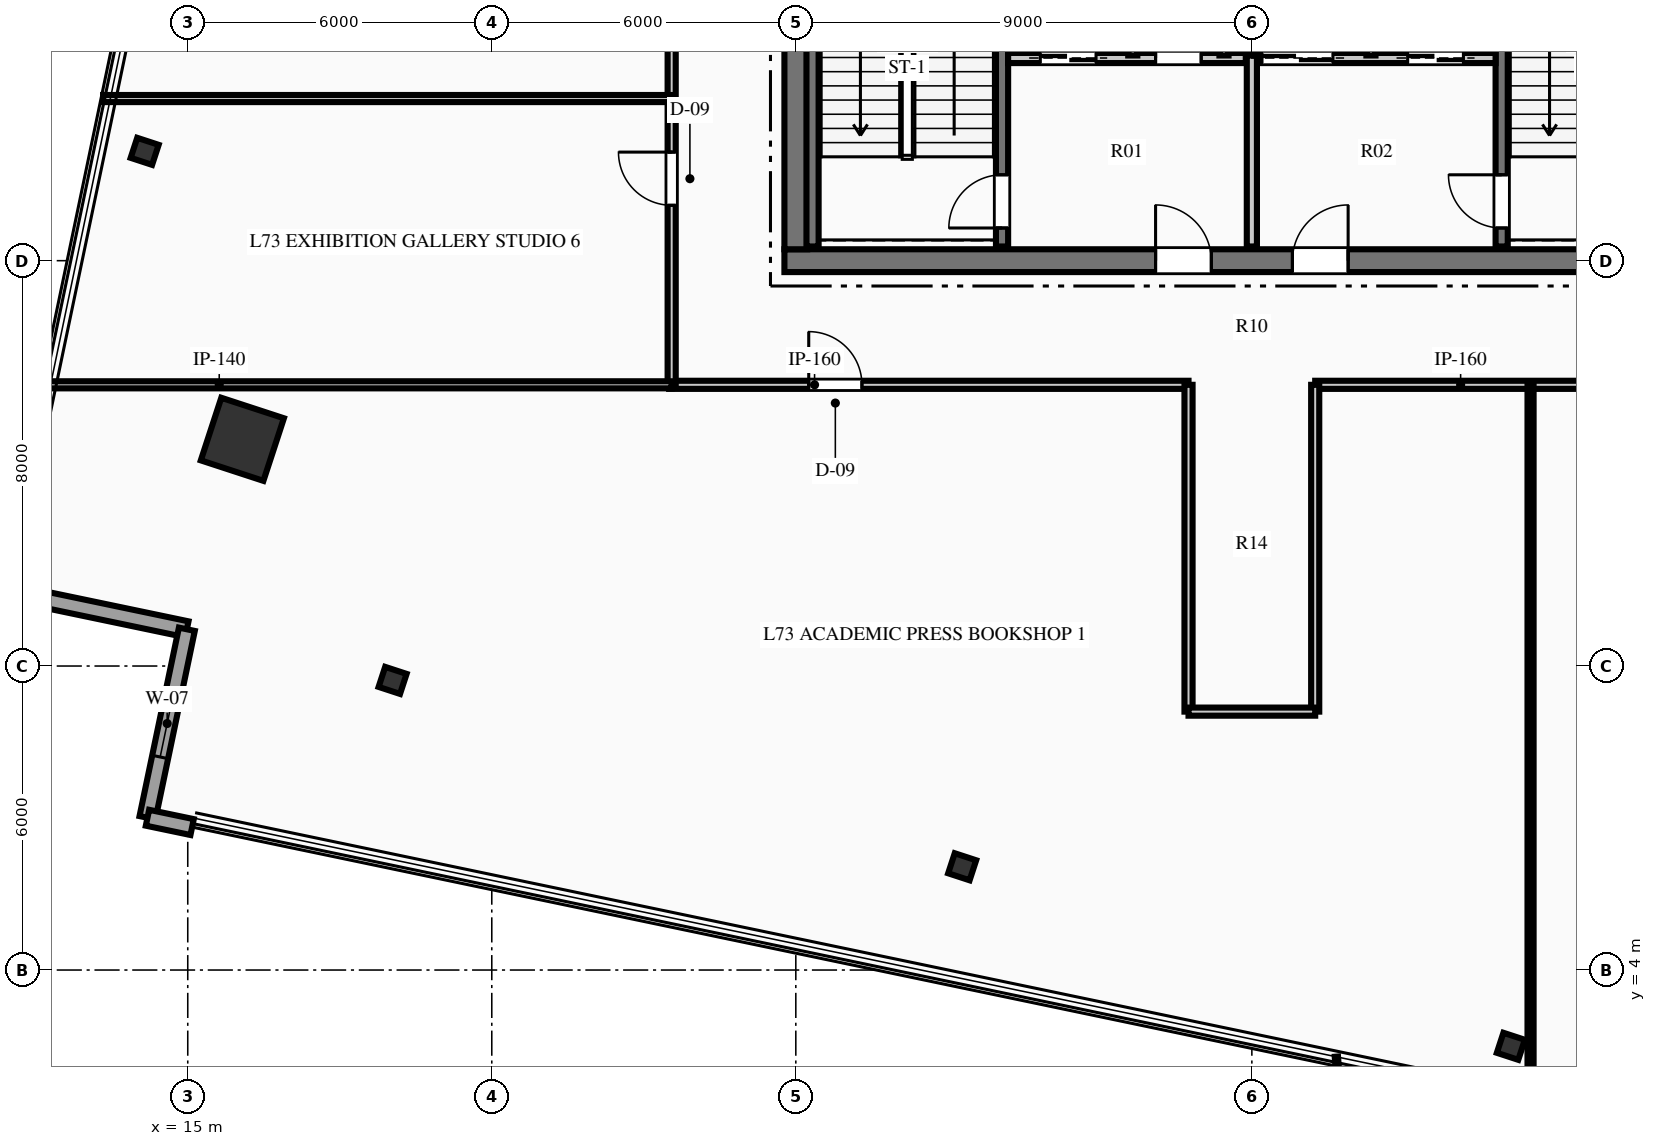
"""IFC4 building model, lengths in metres.
Left out: names, types, materials, properties, quantities, classifications, styles, units other than length and angle.
Written with IfcOpenShell. Run it as: python <this file> out.ifc"""

import sys

from ifc_helpers import new_model, si_unit, direction, frame, frame_2d, origin, origin_2d, place, context, subcontext, project, spatial, rectangle, hollow_rectangle, i_section, extrude, element, fill, save


model = new_model("IFC4")
c1 = context("Model", 3, precision=1e-05, world=origin(), true_north=direction((0.0, 1.0)))
c2 = subcontext(c1, "Body", "Model", "MODEL_VIEW")
j1 = project(units=[si_unit("LENGTHUNIT", "METRE"), si_unit("PLANEANGLEUNIT", "RADIAN")], contexts=[c1])
p1 = place(None, origin())
s1 = spatial("IfcSite", under=j1, at=p1, CompositionType="ELEMENT")
p2 = place(p1, origin())
s2 = spatial("IfcBuilding", under=s1, at=p2, CompositionType="ELEMENT")
p3 = place(p2, frame((0.0, 0.0, 289.95)))
s3 = spatial("IfcBuildingStorey", under=s2, at=p3, CompositionType="ELEMENT", Elevation=289.95)
p4 = place(p3, frame((26.775, 18.0, 0.0), z_axis=(0.0, 0.0, 1.0), x_axis=(1.0, 0.0, 0.0)))
e1 = element("IfcWall", 1, at=p4, inside=s3, PredefinedType="SHEAR", context=c2, shape_type="SweptSolid", body=[
    extrude(rectangle(XDim=18.45, YDim=0.45, at=frame_2d((9.225, 0.0))), origin(), (0.0, 0.0, 1.0), 3.75),
])
p5 = place(p4, frame((7.325, 0.0, 0.0)))
e2 = element("IfcOpeningElement", 2, at=p5, cuts=e1, PredefinedType="OPENING", context=c2, shape_type="SweptSolid", body=[
    extrude(rectangle(XDim=1.1, YDim=2.15, at=frame_2d((0.55, 1.075))), frame((0.0, 0.235, 0.0), z_axis=(0.0, -1.0, 0.0), x_axis=(1.0, 0.0, 0.0)), (0.0, 0.0, 1.0), 0.47),
])
p6 = place(p4, frame((10.025, 0.0, 0.0)))
e3 = element("IfcOpeningElement", 3, at=p6, cuts=e1, PredefinedType="OPENING", context=c2, shape_type="SweptSolid", body=[
    extrude(rectangle(XDim=1.1, YDim=2.15, at=frame_2d((0.55, 1.075))), frame((0.0, 0.235, 0.0), z_axis=(0.0, -1.0, 0.0), x_axis=(1.0, 0.0, 0.0)), (0.0, 0.0, 1.0), 0.47),
])
p7 = place(p3, frame((27.0, 18.225, 0.0), z_axis=(0.0, 0.0, 1.0), x_axis=(0.0, 1.0, 0.0)))
e4 = element("IfcWall", 4, at=p7, inside=s3, PredefinedType="SHEAR", context=c2, shape_type="SweptSolid", body=[
    extrude(rectangle(XDim=15.55, YDim=0.45, at=frame_2d((7.775, 0.0))), origin(), (0.0, 0.0, 1.0), 3.75),
])
p8 = place(p7, frame((10.015, 0.0, 0.0)))
e5 = element("IfcOpeningElement", 5, at=p8, cuts=e4, PredefinedType="OPENING", context=c2, shape_type="SweptSolid", body=[
    extrude(rectangle(XDim=1.4, YDim=2.2, at=frame_2d((0.7, 1.1))), frame((0.0, 0.235, 0.0), z_axis=(0.0, -1.0, 0.0), x_axis=(1.0, 0.0, 0.0)), (0.0, 0.0, 1.0), 0.47),
])
p9 = place(p3, frame((31.07, 18.28, 0.0), z_axis=(0.0, 0.0, 1.0), x_axis=(0.0, 1.0, 0.0)))
e6 = element("IfcWall", 6, at=p9, inside=s3, PredefinedType="SHEAR", context=c2, shape_type="SweptSolid", body=[
    extrude(rectangle(XDim=8.26, YDim=0.24, at=frame_2d((4.13, 0.0))), origin(), (0.0, 0.0, 1.0), 3.75),
])
p10 = place(p9, frame((0.365, 0.0, 0.0)))
e7 = element("IfcOpeningElement", 7, at=p10, cuts=e6, PredefinedType="OPENING", context=c2, shape_type="SweptSolid", body=[
    extrude(rectangle(XDim=1.05, YDim=2.15, at=frame_2d((0.525, 1.075))), frame((0.0, 0.13, 0.0), z_axis=(0.0, -1.0, 0.0), x_axis=(1.0, 0.0, 0.0)), (0.0, 0.0, 1.0), 0.26),
])
p11 = place(p3, frame((27.33, 18.28, 0.0), z_axis=(0.0, 0.0, 1.0), x_axis=(0.0, 1.0, 0.0)))
e8 = element("IfcWall", 8, at=p11, inside=s3, PredefinedType="SHEAR", context=c2, shape_type="SweptSolid", body=[
    extrude(rectangle(XDim=8.26, YDim=0.24, at=frame_2d((4.13, 0.0))), origin(), (0.0, 0.0, 1.0), 3.75),
])
p12 = place(p3, frame((40.93, 18.28, 0.0), z_axis=(0.0, 0.0, 1.0), x_axis=(0.0, 1.0, 0.0)))
e9 = element("IfcWall", 9, at=p12, inside=s3, PredefinedType="SHEAR", context=c2, shape_type="SweptSolid", body=[
    extrude(rectangle(XDim=8.26, YDim=0.24, at=frame_2d((4.13, 0.0))), origin(), (0.0, 0.0, 1.0), 3.75),
])
p13 = place(p12, frame((0.365, 0.0, 0.0)))
e10 = element("IfcOpeningElement", 10, at=p13, cuts=e9, PredefinedType="OPENING", context=c2, shape_type="SweptSolid", body=[
    extrude(rectangle(XDim=1.05, YDim=2.15, at=frame_2d((0.525, 1.075))), frame((0.0, 0.13, 0.0), z_axis=(0.0, -1.0, 0.0), x_axis=(1.0, 0.0, 0.0)), (0.0, 0.0, 1.0), 0.26),
])
p14 = place(p3, frame((16.077, 14.475, 0.0), z_axis=(0.0, 0.0, 1.0), x_axis=(0.311008203279, 0.950407227189, 0.0)))
e11 = element("IfcColumn", 11, at=p14, inside=s3, PredefinedType="COLUMN", context=c2, shape_type="SweptSolid", body=[
    extrude(hollow_rectangle(XDim=1.3, YDim=1.3, WallThickness=0.06, at=origin_2d()), origin(), (0.0, 0.0, 1.0), 3.75),
])
for number, where, z_axis, x_axis in (
    (12, (14.149, 20.158, 0.0), (0.0, 0.0, 1.0), (0.311, 0.95, 0.0)),
    (13, (19.043, 9.716, 0.0), (0.0, 0.0, 1.0), (0.311, 0.95, 0.0)),
    (14, (30.283, 6.038, 0.0), (0.0, 0.0, 1.0), (0.311, 0.95, 0.0)),
    (15, (41.111, 2.495, 0.0), (0.0, 0.0, 1.0), (0.311, 0.95, 0.0)),
):
    element("IfcColumn", number, at=place(p3, frame(where, z_axis=z_axis, x_axis=x_axis)), inside=s3, PredefinedType="COLUMN", context=c2, shape_type="SweptSolid", body=[
        extrude(i_section(OverallWidth=0.416, OverallDepth=0.445, WebThickness=0.039, FlangeThickness=0.063, at=origin_2d()), origin(), (0.0, 0.0, 1.0), 3.75),
    ])
p15 = place(p3, frame((14.982, 10.725, 0.0), z_axis=(0.0, 0.0, 1.0), x_axis=(-0.978879813472, 0.204436569078, 0.0)))
e16 = element("IfcWall", 16, at=p15, inside=s3, PredefinedType="STANDARD", context=c2, shape_type="SweptSolid", body=[
    extrude(rectangle(XDim=3.8, YDim=0.32, at=frame_2d((1.9, 0.0))), origin(), (0.0, 0.0, 1.0), 3.34),
])
p16 = place(p3, frame((14.205, 7.006, 0.0), z_axis=(0.0, 0.0, 1.0), x_axis=(0.204498130493, 0.978866954506, 0.0)))
e17 = element("IfcWall", 17, at=p16, inside=s3, PredefinedType="STANDARD", context=c2, shape_type="SweptSolid", body=[
    extrude(rectangle(XDim=3.8, YDim=0.32, at=frame_2d((1.9, 0.0))), origin(), (0.0, 0.0, 1.0), 3.34),
])
p17 = place(p16, frame((1.225, 0.0, 0.85)))
e18 = element("IfcOpeningElement", 18, at=p17, cuts=e17, PredefinedType="OPENING", context=c2, shape_type="SweptSolid", body=[
    extrude(rectangle(XDim=1.35, YDim=1.95, at=frame_2d((0.675, 0.975))), frame((0.0, 0.17, 0.0), z_axis=(0.0, -1.0, 0.0), x_axis=(1.0, 0.0, 0.0)), (0.0, 0.0, 1.0), 0.34),
])
p18 = place(p3, frame((15.086, 6.822, 0.0), z_axis=(0.0, 0.0, 1.0), x_axis=(-0.978865183405, 0.204506608004, 0.0)))
e19 = element("IfcWall", 19, at=p18, inside=s3, PredefinedType="STANDARD", context=c2, shape_type="SweptSolid", body=[
    extrude(rectangle(XDim=0.9, YDim=0.32, at=frame_2d((0.45, 0.0))), origin(), (0.0, 0.0, 1.0), 3.34),
])
p19 = place(p3, frame((36.0, 18.28, 0.0), z_axis=(0.0, 0.0, 1.0), x_axis=(0.0, 1.0, 0.0)))
e20 = element("IfcWall", 20, at=p19, inside=s3, PredefinedType="PARTITIONING", context=c2, shape_type="SweptSolid", body=[
    extrude(rectangle(XDim=3.77, YDim=0.2, at=frame_2d((1.885, 0.0))), origin(), (0.0, 0.0, 1.0), 3.34),
])
p20 = place(p3, frame((31.19, 22.0, 0.0), z_axis=(0.0, 0.0, 1.0), x_axis=(1.0, 0.0, 0.0)))
e21 = element("IfcWall", 21, at=p20, inside=s3, PredefinedType="PARTITIONING", context=c2, shape_type="SweptSolid", body=[
    extrude(rectangle(XDim=4.69, YDim=0.2, at=frame_2d((2.345, 0.0))), origin(), (0.0, 0.0, 1.0), 3.34),
])
p21 = place(p20, frame((2.91, 0.0, 0.0)))
e22 = element("IfcOpeningElement", 22, at=p21, cuts=e21, PredefinedType="OPENING", context=c2, shape_type="SweptSolid", body=[
    extrude(rectangle(XDim=0.9, YDim=2.15, at=frame_2d((0.45, 1.075))), frame((0.0, 0.11, 0.0), z_axis=(0.0, -1.0, 0.0), x_axis=(1.0, 0.0, 0.0)), (0.0, 0.0, 1.0), 0.22),
])
p22 = place(p20, frame((0.635, 0.0, 0.0)))
e23 = element("IfcOpeningElement", 23, at=p22, cuts=e21, PredefinedType="OPENING", context=c2, shape_type="SweptSolid", body=[
    extrude(rectangle(XDim=1.1, YDim=2.15, at=frame_2d((0.55, 1.075))), frame((0.0, 0.11, 0.0), z_axis=(0.0, -1.0, 0.0), x_axis=(1.0, 0.0, 0.0)), (0.0, 0.0, 1.0), 0.22),
])
p23 = place(p3, frame((36.12, 22.0, 0.0), z_axis=(0.0, 0.0, 1.0), x_axis=(1.0, 0.0, 0.0)))
e24 = element("IfcWall", 24, at=p23, inside=s3, PredefinedType="PARTITIONING", context=c2, shape_type="SweptSolid", body=[
    extrude(rectangle(XDim=4.69, YDim=0.2, at=frame_2d((2.345, 0.0))), origin(), (0.0, 0.0, 1.0), 3.34),
])
p24 = place(p23, frame((2.955, 0.0, 0.0)))
e25 = element("IfcOpeningElement", 25, at=p24, cuts=e24, PredefinedType="OPENING", context=c2, shape_type="SweptSolid", body=[
    extrude(rectangle(XDim=1.1, YDim=2.15, at=frame_2d((0.55, 1.075))), frame((0.0, 0.11, 0.0), z_axis=(0.0, -1.0, 0.0), x_axis=(1.0, 0.0, 0.0)), (0.0, 0.0, 1.0), 0.22),
])
p25 = place(p23, frame((0.08, 0.0, 0.0)))
e26 = element("IfcOpeningElement", 26, at=p25, cuts=e24, PredefinedType="OPENING", context=c2, shape_type="SweptSolid", body=[
    extrude(rectangle(XDim=1.4, YDim=2.2, at=frame_2d((0.7, 1.1))), frame((0.0, 0.11, 0.0), z_axis=(0.0, -1.0, 0.0), x_axis=(1.0, 0.0, 0.0)), (0.0, 0.0, 1.0), 0.22),
])
for number, where, z_axis, x_axis in (
    (27, (33.65, 22.05, 0.0), (0.0, 0.0, 1.0), (0.0, 1.0, 0.0)),
    (28, (35.45, 22.05, 0.0), (0.0, 0.0, 1.0), (0.0, 1.0, 0.0)),
    (29, (38.35, 22.05, 0.0), (0.0, 0.0, 1.0), (0.0, 1.0, 0.0)),
):
    element("IfcWall", number, at=place(p3, frame(where, z_axis=z_axis, x_axis=x_axis)), inside=s3, PredefinedType="PARTITIONING", context=c2, shape_type="SweptSolid", body=[
        extrude(rectangle(XDim=2.6, YDim=0.18, at=frame_2d((1.3, 0.0))), origin(), (0.0, 0.0, 1.0), 3.34),
    ])
p26 = place(p3, frame((24.5, 15.55, 0.0), z_axis=(0.0, 0.0, 1.0), x_axis=(1.0, 0.0, 0.0)))
e30 = element("IfcWall", 30, at=p26, inside=s3, PredefinedType="PARTITIONING", context=c2, shape_type="SweptSolid", body=[
    extrude(rectangle(XDim=10.25, YDim=0.16, at=frame_2d((5.125, 0.0))), origin(), (0.0, 0.0, 1.0), 3.34),
])
p27 = place(p26, frame((2.755, 0.0, 0.0)))
e31 = element("IfcOpeningElement", 31, at=p27, cuts=e30, PredefinedType="OPENING", context=c2, shape_type="SweptSolid", body=[
    extrude(rectangle(XDim=1.05, YDim=2.15, at=frame_2d((0.525, 1.075))), frame((0.0, 0.09, 0.0), z_axis=(0.0, -1.0, 0.0), x_axis=(1.0, 0.0, 0.0)), (0.0, 0.0, 1.0), 0.18),
])
p28 = place(p3, frame((37.25, 15.55, 0.0), z_axis=(0.0, 0.0, 1.0), x_axis=(1.0, 0.0, 0.0)))
e32 = element("IfcWall", 32, at=p28, inside=s3, PredefinedType="PARTITIONING", context=c2, shape_type="SweptSolid", body=[
    extrude(rectangle(XDim=10.25, YDim=0.16, at=frame_2d((5.125, 0.0))), origin(), (0.0, 0.0, 1.0), 3.34),
])
p29 = place(p28, frame((5.419, 0.0, 0.0)))
e33 = element("IfcOpeningElement", 33, at=p29, cuts=e32, PredefinedType="OPENING", context=c2, shape_type="SweptSolid", body=[
    extrude(rectangle(XDim=1.05, YDim=2.15, at=frame_2d((0.525, 1.075))), frame((0.0, 0.09, 0.0), z_axis=(0.0, -1.0, 0.0), x_axis=(1.0, 0.0, 0.0)), (0.0, 0.0, 1.0), 0.18),
])
p30 = place(p3, frame((24.55, 15.55, 0.0), z_axis=(0.0, 0.0, 1.0), x_axis=(0.0, 1.0, 0.0)))
e34 = element("IfcWall", 34, at=p30, inside=s3, PredefinedType="PARTITIONING", context=c2, shape_type="SweptSolid", body=[
    extrude(rectangle(XDim=9.2, YDim=0.16, at=frame_2d((4.6, 0.0))), origin(), (0.0, 0.0, 1.0), 3.34),
])
p31 = place(p30, frame((3.543, 0.0, 0.0)))
e35 = element("IfcOpeningElement", 35, at=p31, cuts=e34, PredefinedType="OPENING", context=c2, shape_type="SweptSolid", body=[
    extrude(rectangle(XDim=1.05, YDim=2.15, at=frame_2d((0.525, 1.075))), frame((0.0, 0.09, 0.0), z_axis=(0.0, -1.0, 0.0), x_axis=(1.0, 0.0, 0.0)), (0.0, 0.0, 1.0), 0.18),
])
for number, where, z_axis, x_axis in (
    (36, (34.75, 9.1, 0.0), (0.0, 0.0, 1.0), (0.0, 1.0, 0.0)),
    (37, (37.25, 9.1, 0.0), (0.0, 0.0, 1.0), (0.0, 1.0, 0.0)),
):
    element("IfcWall", number, at=place(p3, frame(where, z_axis=z_axis, x_axis=x_axis)), inside=s3, PredefinedType="PARTITIONING", context=c2, shape_type="SweptSolid", body=[
        extrude(rectangle(XDim=6.45, YDim=0.16, at=frame_2d((3.225, 0.0))), origin(), (0.0, 0.0, 1.0), 3.34),
    ])
p32 = place(p3, frame((34.75, 9.1, 0.0), z_axis=(0.0, 0.0, 1.0), x_axis=(1.0, 0.0, 0.0)))
e38 = element("IfcWall", 38, at=p32, inside=s3, PredefinedType="PARTITIONING", context=c2, shape_type="SweptSolid", body=[
    extrude(rectangle(XDim=2.5, YDim=0.16, at=frame_2d((1.25, 0.0))), origin(), (0.0, 0.0, 1.0), 3.34),
])
p33 = place(p3, frame((12.149, 15.55, 0.0), z_axis=(0.0, 0.0, 1.0), x_axis=(1.0, 0.0, 0.0)))
e39 = element("IfcWall", 39, at=p33, inside=s3, PredefinedType="PARTITIONING", context=c2, shape_type="SweptSolid", body=[
    extrude(rectangle(XDim=12.401, YDim=0.14, at=frame_2d((6.201, 0.0))), origin(), (0.0, 0.0, 1.0), 2.718),
])
p34 = place(p3, frame((41.5, 1.344, 0.0), z_axis=(0.0, 0.0, 1.0), x_axis=(0.0, 1.0, 0.0)))
e40 = element("IfcWall", 40, at=p34, inside=s3, PredefinedType="PARTITIONING", context=c2, shape_type="SweptSolid", body=[
    extrude(rectangle(XDim=14.206, YDim=0.12, at=frame_2d((7.103, 0.0))), origin(), (0.0, 0.0, 1.0), 3.34),
])
p35 = place(p3, frame((13.329, 21.2, 0.0), z_axis=(0.0, 0.0, 1.0), x_axis=(1.0, 0.0, 0.0)))
e41 = element("IfcWall", 41, at=p35, inside=s3, PredefinedType="PARTITIONING", context=c2, shape_type="SweptSolid", body=[
    extrude(rectangle(XDim=11.221, YDim=0.14, at=frame_2d((5.61, 0.0))), origin(), (0.0, 0.0, 1.0), 3.34),
])
p36 = place(p17, origin())
e42 = element("IfcWindow", 42, at=p36, inside=s3, PartitioningType="SINGLE_PANEL", PredefinedType="WINDOW", context=c2, shape_type="SweptSolid", body=[
    extrude(rectangle(XDim=1.35, YDim=1.95, at=frame_2d((0.675, 0.975))), frame((0.0, 0.03, 0.0), z_axis=(0.0, -1.0, 0.0), x_axis=(1.0, 0.0, 0.0)), (0.0, 0.0, 1.0), 0.06),
])
fill(e18, e42)
p37 = place(p10, origin())
e43 = element("IfcDoor", 43, at=p37, inside=s3, OperationType="SINGLE_SWING_LEFT", PredefinedType="DOOR", context=c2, shape_type="SweptSolid", body=[
    extrude(rectangle(XDim=1.05, YDim=2.15, at=frame_2d((0.525, 1.075))), frame((0.0, 0.025, 0.0), z_axis=(0.0, -1.0, 0.0), x_axis=(1.0, 0.0, 0.0)), (0.0, 0.0, 1.0), 0.05),
])
fill(e7, e43)
p38 = place(p13, origin())
e44 = element("IfcDoor", 44, at=p38, inside=s3, OperationType="SINGLE_SWING_RIGHT", PredefinedType="DOOR", context=c2, shape_type="SweptSolid", body=[
    extrude(rectangle(XDim=1.05, YDim=2.15, at=frame_2d((0.525, 1.075))), frame((0.0, 0.025, 0.0), z_axis=(0.0, -1.0, 0.0), x_axis=(1.0, 0.0, 0.0)), (0.0, 0.0, 1.0), 0.05),
])
fill(e10, e44)
p39 = place(p5, origin())
e45 = element("IfcDoor", 45, at=p39, inside=s3, OperationType="SINGLE_SWING_LEFT", PredefinedType="DOOR", context=c2, shape_type="SweptSolid", body=[
    extrude(rectangle(XDim=1.1, YDim=2.15, at=frame_2d((0.55, 1.075))), frame((0.0, 0.025, 0.0), z_axis=(0.0, -1.0, 0.0), x_axis=(1.0, 0.0, 0.0)), (0.0, 0.0, 1.0), 0.05),
])
fill(e2, e45)
p40 = place(p6, origin())
e46 = element("IfcDoor", 46, at=p40, inside=s3, OperationType="SINGLE_SWING_RIGHT", PredefinedType="DOOR", context=c2, shape_type="SweptSolid", body=[
    extrude(rectangle(XDim=1.1, YDim=2.15, at=frame_2d((0.55, 1.075))), frame((0.0, 0.025, 0.0), z_axis=(0.0, -1.0, 0.0), x_axis=(1.0, 0.0, 0.0)), (0.0, 0.0, 1.0), 0.05),
])
fill(e3, e46)
p41 = place(p21, origin())
e47 = element("IfcDoor", 47, at=p41, inside=s3, OperationType="SINGLE_SWING_LEFT", PredefinedType="DOOR", context=c2, shape_type="SweptSolid", body=[
    extrude(rectangle(XDim=0.9, YDim=2.15, at=frame_2d((0.45, 1.075))), frame((0.0, 0.025, 0.0), z_axis=(0.0, -1.0, 0.0), x_axis=(1.0, 0.0, 0.0)), (0.0, 0.0, 1.0), 0.05),
])
fill(e22, e47)
p42 = place(p27, origin())
e48 = element("IfcDoor", 48, at=p42, inside=s3, OperationType="SINGLE_SWING_LEFT", PredefinedType="DOOR", context=c2, shape_type="SweptSolid", body=[
    extrude(rectangle(XDim=1.05, YDim=2.15, at=frame_2d((0.525, 1.075))), frame((0.0, 0.025, 0.0), z_axis=(0.0, -1.0, 0.0), x_axis=(1.0, 0.0, 0.0)), (0.0, 0.0, 1.0), 0.05),
])
fill(e31, e48)
p43 = place(p31, origin())
e49 = element("IfcDoor", 49, at=p43, inside=s3, OperationType="SINGLE_SWING_RIGHT", PredefinedType="DOOR", context=c2, shape_type="SweptSolid", body=[
    extrude(rectangle(XDim=1.05, YDim=2.15, at=frame_2d((0.525, 1.075))), frame((0.0, 0.025, 0.0), z_axis=(0.0, -1.0, 0.0), x_axis=(1.0, 0.0, 0.0)), (0.0, 0.0, 1.0), 0.05),
])
fill(e35, e49)
p44 = place(p22, origin())
e50 = element("IfcDoor", 50, at=p44, inside=s3, OperationType="SLIDING_TO_LEFT", PredefinedType="DOOR", context=c2, shape_type="SweptSolid", body=[
    extrude(rectangle(XDim=1.1, YDim=2.15, at=frame_2d((0.55, 1.075))), frame((0.0, 0.025, 0.0), z_axis=(0.0, -1.0, 0.0), x_axis=(1.0, 0.0, 0.0)), (0.0, 0.0, 1.0), 0.05),
])
fill(e23, e50)
p45 = place(p24, origin())
e51 = element("IfcDoor", 51, at=p45, inside=s3, OperationType="SLIDING_TO_LEFT", PredefinedType="DOOR", context=c2, shape_type="SweptSolid", body=[
    extrude(rectangle(XDim=1.1, YDim=2.15, at=frame_2d((0.55, 1.075))), frame((0.0, 0.025, 0.0), z_axis=(0.0, -1.0, 0.0), x_axis=(1.0, 0.0, 0.0)), (0.0, 0.0, 1.0), 0.05),
])
fill(e25, e51)
p46 = place(p25, origin())
e52 = element("IfcDoor", 52, at=p46, inside=s3, OperationType="SLIDING_TO_LEFT", PredefinedType="DOOR", context=c2, shape_type="SweptSolid", body=[
    extrude(rectangle(XDim=1.4, YDim=2.2, at=frame_2d((0.7, 1.1))), frame((0.0, 0.025, 0.0), z_axis=(0.0, -1.0, 0.0), x_axis=(1.0, 0.0, 0.0)), (0.0, 0.0, 1.0), 0.05),
])
fill(e26, e52)
save(model, sys.argv[1])
